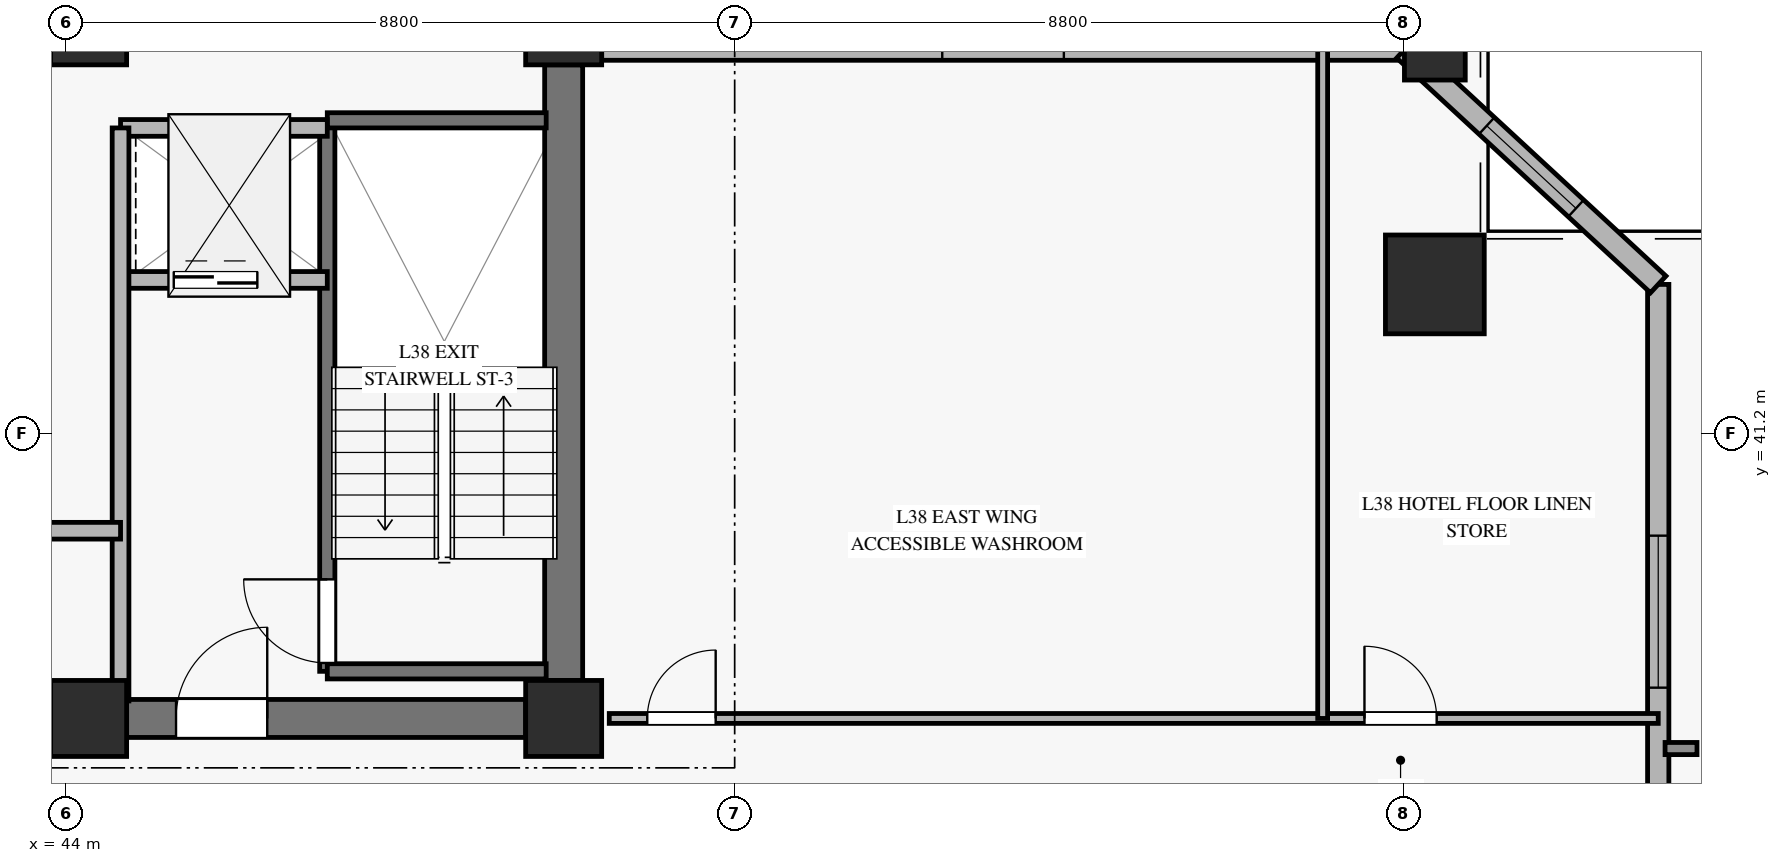
"""IFC4 building model, lengths in metres.
Left out: names, types, materials, properties, quantities, classifications, styles, units other than length and angle.
Written with IfcOpenShell. Run it as: python <this file> out.ifc"""

import sys

from ifc_helpers import new_model, si_unit, direction, frame, frame_2d, origin, origin_2d, place, context, subcontext, project, spatial, rectangle, hollow_rectangle, extrude, source, transform, mapped, element, fill, save


model = new_model("IFC4")
c1 = context("Model", 3, precision=1e-05, world=origin(), true_north=direction((0.0, 1.0)))
c2 = subcontext(c1, "Body", "Model", "MODEL_VIEW")
j1 = project(units=[si_unit("LENGTHUNIT", "METRE"), si_unit("PLANEANGLEUNIT", "RADIAN")], contexts=[c1])
p1 = place(None, origin())
s1 = spatial("IfcSite", under=j1, at=p1, CompositionType="ELEMENT")
p2 = place(p1, origin())
s2 = spatial("IfcBuilding", under=s1, at=p2, CompositionType="ELEMENT")
p3 = place(p2, frame((0.0, 0.0, 156.2)))
s3 = spatial("IfcBuildingStorey", under=s2, at=p3, CompositionType="ELEMENT", Elevation=156.2)
m1 = source(origin(), c2, "Body", "SweptSolid", [
    extrude(rectangle(XDim=1.0, YDim=1.0, at=origin_2d()), origin(), (0.0, 0.0, 1.0), 3.27),
])
for number, where, z_axis, x_axis in (
    (1, (44.3, 37.45, 0.0), (0.0, 0.0, 1.0), (1.0, 0.0, 0.0)),
    (2, (44.3, 46.55, 0.0), (0.0, 0.0, 1.0), (1.0, 0.0, 0.0)),
    (3, (50.55, 37.45, 0.0), (0.0, 0.0, 1.0), (1.0, 0.0, 0.0)),
    (4, (50.55, 46.55, 0.0), (0.0, 0.0, 1.0), (1.0, 0.0, 0.0)),
):
    element("IfcColumn", number, at=place(p3, frame(where, z_axis=z_axis, x_axis=x_axis)), inside=s3, PredefinedType="PILASTER", context=c2, shape_type="MappedRepresentation", body=[
        mapped(m1, transform((0.0, 0.0, 0.0), x_axis=(1.0, 0.0, 0.0), y_axis=(0.0, 1.0, 0.0), z_axis=(0.0, 0.0, 1.0), scale=1.0)),
    ])
p4 = place(p3, frame((44.8, 37.45, 0.0), z_axis=(0.0, 0.0, 1.0), x_axis=(1.0, 0.0, 0.0)))
e5 = element("IfcWall", 5, at=p4, inside=s3, PredefinedType="SHEAR", context=c2, shape_type="SweptSolid", body=[
    extrude(rectangle(XDim=5.25, YDim=0.5, at=frame_2d((2.625, 0.0))), origin(), (0.0, 0.0, 1.0), 3.27),
])
p5 = place(p4, frame((0.65, 0.0, 0.0)))
e6 = element("IfcOpeningElement", 6, at=p5, cuts=e5, PredefinedType="OPENING", context=c2, shape_type="SweptSolid", body=[
    extrude(rectangle(XDim=1.2, YDim=2.15, at=frame_2d((0.6, 1.075))), frame((0.0, 0.26, 0.0), z_axis=(0.0, -1.0, 0.0), x_axis=(1.0, 0.0, 0.0)), (0.0, 0.0, 1.0), 0.52),
])
p6 = place(p3, frame((50.55, 37.95, 0.0), z_axis=(0.0, 0.0, 1.0), x_axis=(0.0, 1.0, 0.0)))
e7 = element("IfcWall", 7, at=p6, inside=s3, PredefinedType="SHEAR", context=c2, shape_type="SweptSolid", body=[
    extrude(rectangle(XDim=8.1, YDim=0.5, at=frame_2d((4.05, 0.0))), origin(), (0.0, 0.0, 1.0), 3.27),
])
m2 = source(origin(), c2, "Body", "SweptSolid", [
    extrude(hollow_rectangle(XDim=1.3, YDim=1.3, WallThickness=0.06, at=origin_2d()), origin(), (0.0, 0.0, 1.0), 3.277),
])
p7 = place(p3, frame((62.012, 43.161, 0.0), z_axis=(-0.063777069764, 0.007972133721, 0.997932327594), x_axis=(-0.124034734589, -0.992277876714, 0.0)))
e8 = element("IfcColumn", 8, at=p7, inside=s3, PredefinedType="COLUMN", context=c2, shape_type="MappedRepresentation", body=[
    mapped(m2, transform((0.0, 0.0, 0.0), x_axis=(1.0, 0.0, 0.0), y_axis=(0.0, 1.0, 0.0), z_axis=(0.0, 0.0, 1.0), scale=1.0)),
])
m3 = source(origin(), c2, "Body", "SweptSolid", [
    extrude(hollow_rectangle(XDim=0.8, YDim=0.8, WallThickness=0.036, at=origin_2d()), origin(), (0.0, 0.0, 1.0), 3.277),
])
p8 = place(p3, frame((62.012, 46.25, 0.0), z_axis=(-0.063779096534, 0.0, 0.997964040858), x_axis=(0.0, -1.0, 0.0)))
e9 = element("IfcColumn", 9, at=p8, inside=s3, PredefinedType="COLUMN", context=c2, shape_type="MappedRepresentation", body=[
    mapped(m3, transform((0.0, 0.0, 0.0), x_axis=(1.0, 0.0, 0.0), y_axis=(0.0, 1.0, 0.0), z_axis=(0.0, 0.0, 1.0), scale=1.0)),
])
p9 = place(p3, frame((64.951, 27.736, 0.0), z_axis=(0.0, 0.0, 1.0), x_axis=(0.0, 1.0, 0.0)))
e10 = element("IfcWall", 10, at=p9, inside=s3, PredefinedType="SOLIDWALL", context=c2, shape_type="SweptSolid", body=[
    extrude(rectangle(XDim=15.425, YDim=0.28, at=frame_2d((7.712, 0.0))), origin(), (0.0, 0.0, 1.0), 2.75),
])
p10 = place(p9, frame((10.119, 0.0, 0.45)))
e11 = element("IfcOpeningElement", 11, at=p10, cuts=e10, PredefinedType="OPENING", context=c2, shape_type="SweptSolid", body=[
    extrude(rectangle(XDim=2.0, YDim=2.0, at=frame_2d((1.0, 1.0))), frame((0.0, 0.15, 0.0), z_axis=(0.0, -1.0, 0.0), x_axis=(1.0, 0.0, 0.0)), (0.0, 0.0, 1.0), 0.3),
])
p11 = place(p3, frame((51.05, 46.25, 0.0), z_axis=(0.0, 0.0, 1.0), x_axis=(1.0, 0.0, 0.0)))
e12 = element("IfcWall", 12, at=p11, inside=s3, PredefinedType="SOLIDWALL", context=c2, shape_type="SweptSolid", body=[
    extrude(rectangle(XDim=10.562, YDim=0.28, at=frame_2d((5.281, 0.0))), origin(), (0.0, 0.0, 1.0), 2.75),
])
p12 = place(p11, frame((4.481, 0.0, 0.45)))
e13 = element("IfcOpeningElement", 13, at=p12, cuts=e12, PredefinedType="OPENING", context=c2, shape_type="SweptSolid", body=[
    extrude(rectangle(XDim=1.6, YDim=2.0, at=frame_2d((0.8, 1.0))), frame((0.0, 0.15, 0.0), z_axis=(0.0, -1.0, 0.0), x_axis=(1.0, 0.0, 0.0)), (0.0, 0.0, 1.0), 0.3),
])
p13 = place(p3, frame((64.951, 43.161, 0.0), z_axis=(0.0, 0.0, 1.0), x_axis=(-0.734027196995, 0.679120073383, 0.0)))
e14 = element("IfcWall", 14, at=p13, inside=s3, PredefinedType="SOLIDWALL", context=c2, shape_type="SweptSolid", body=[
    extrude(rectangle(XDim=4.549, YDim=0.3, at=frame_2d((2.274, 0.0))), origin(), (0.0, 0.0, 1.0), 2.75),
])
p14 = place(p13, frame((1.474, 0.0, 0.45)))
e15 = element("IfcOpeningElement", 15, at=p14, cuts=e14, PredefinedType="OPENING", context=c2, shape_type="SweptSolid", body=[
    extrude(rectangle(XDim=1.6, YDim=2.0, at=frame_2d((0.8, 1.0))), frame((0.0, 0.16, 0.0), z_axis=(0.0, -1.0, 0.0), x_axis=(1.0, 0.0, 0.0)), (0.0, 0.0, 1.0), 0.32),
])
p15 = place(p3, frame((47.44, 38.07, 0.0), z_axis=(0.0, 0.0, 1.0), x_axis=(0.0, 1.0, 0.0)))
e16 = element("IfcWall", 16, at=p15, inside=s3, PredefinedType="SOLIDWALL", context=c2, shape_type="SweptSolid", body=[
    extrude(rectangle(XDim=7.25, YDim=0.2, at=frame_2d((3.625, 0.0))), origin(), (0.0, 0.0, 1.0), 3.5),
])
p16 = place(p15, frame((0.11, 0.0, 0.0)))
e17 = element("IfcOpeningElement", 17, at=p16, cuts=e16, PredefinedType="OPENING", context=c2, shape_type="SweptSolid", body=[
    extrude(rectangle(XDim=1.1, YDim=2.15, at=frame_2d((0.55, 1.075))), frame((0.0, 0.11, 0.0), z_axis=(0.0, -1.0, 0.0), x_axis=(1.0, 0.0, 0.0)), (0.0, 0.0, 1.0), 0.22),
])
for number, where, z_axis, x_axis in (
    (18, (47.44, 45.32, 0.0), (0.0, 0.0, 1.0), (1.0, 0.0, 0.0)),
    (19, (47.44, 38.07, 0.0), (0.0, 0.0, 1.0), (1.0, 0.0, 0.0)),
):
    element("IfcWall", number, at=place(p3, frame(where, z_axis=z_axis, x_axis=x_axis)), inside=s3, PredefinedType="SOLIDWALL", context=c2, shape_type="SweptSolid", body=[
        extrude(rectangle(XDim=2.88, YDim=0.2, at=frame_2d((1.44, 0.0))), origin(), (0.0, 0.0, 1.0), 3.5),
    ])
p17 = place(p3, frame((44.72, 43.22, 0.0), z_axis=(0.0, 0.0, 1.0), x_axis=(1.0, 0.0, 0.0)))
e20 = element("IfcWall", 20, at=p17, inside=s3, PredefinedType="SOLIDWALL", context=c2, shape_type="SweptSolid", body=[
    extrude(rectangle(XDim=2.72, YDim=0.22, at=frame_2d((1.36, 0.0))), origin(), (0.0, 0.0, 1.0), 3.27),
])
p18 = place(p17, frame((0.7, 0.0, 0.0)))
e21 = element("IfcOpeningElement", 21, at=p18, cuts=e20, PredefinedType="OPENING", context=c2, shape_type="SweptSolid", body=[
    extrude(rectangle(XDim=1.1, YDim=2.2, at=frame_2d((0.55, 1.1))), frame((0.0, 0.12, 0.0), z_axis=(0.0, -1.0, 0.0), x_axis=(1.0, 0.0, 0.0)), (0.0, 0.0, 1.0), 0.24),
])
p19 = place(p3, frame((44.72, 45.22, 0.0), z_axis=(0.0, 0.0, 1.0), x_axis=(1.0, 0.0, 0.0)))
e22 = element("IfcWall", 22, at=p19, inside=s3, PredefinedType="SOLIDWALL", context=c2, shape_type="SweptSolid", body=[
    extrude(rectangle(XDim=2.72, YDim=0.22, at=frame_2d((1.36, 0.0))), origin(), (0.0, 0.0, 1.0), 3.27),
])
p20 = place(p3, frame((44.72, 37.68, 0.0), z_axis=(0.0, 0.0, 1.0), x_axis=(0.0, 1.0, 0.0)))
e23 = element("IfcWall", 23, at=p20, inside=s3, PredefinedType="SOLIDWALL", context=c2, shape_type="SweptSolid", body=[
    extrude(rectangle(XDim=7.54, YDim=0.22, at=frame_2d((3.77, 0.0))), origin(), (0.0, 0.0, 1.0), 3.27),
])
p21 = place(p3, frame((36.12, 39.92, 0.0), z_axis=(0.0, 0.0, 1.0), x_axis=(1.0, 0.0, 0.0)))
e24 = element("IfcWall", 24, at=p21, inside=s3, PredefinedType="SOLIDWALL", context=c2, shape_type="SweptSolid", body=[
    extrude(rectangle(XDim=8.6, YDim=0.22, at=frame_2d((4.3, 0.0))), origin(), (0.0, 0.0, 1.0), 2.555),
])
p22 = place(p3, frame((51.15, 37.45, 0.0), z_axis=(0.0, 0.0, 1.0), x_axis=(1.0, 0.0, 0.0)))
e25 = element("IfcWall", 25, at=p22, inside=s3, PredefinedType="PARTITIONING", context=c2, shape_type="SweptSolid", body=[
    extrude(rectangle(XDim=13.801, YDim=0.13, at=frame_2d((6.9, 0.0))), origin(), (0.0, 0.0, 1.0), 2.755),
])
p23 = place(p22, frame((0.5, 0.0, 0.0)))
e26 = element("IfcOpeningElement", 26, at=p23, cuts=e25, PredefinedType="OPENING", context=c2, shape_type="SweptSolid", body=[
    extrude(rectangle(XDim=0.9, YDim=2.1, at=frame_2d((0.45, 1.05))), frame((0.0, 0.075, 0.0), z_axis=(0.0, -1.0, 0.0), x_axis=(1.0, 0.0, 0.0)), (0.0, 0.0, 1.0), 0.15),
])
p24 = place(p22, frame((9.936, 0.0, 0.0)))
e27 = element("IfcOpeningElement", 27, at=p24, cuts=e25, PredefinedType="OPENING", context=c2, shape_type="SweptSolid", body=[
    extrude(rectangle(XDim=0.95, YDim=2.1, at=frame_2d((0.475, 1.05))), frame((0.0, 0.075, 0.0), z_axis=(0.0, -1.0, 0.0), x_axis=(1.0, 0.0, 0.0)), (0.0, 0.0, 1.0), 0.15),
])
p25 = place(p3, frame((60.536, 37.45, 0.0), z_axis=(0.0, 0.0, 1.0), x_axis=(0.0, 1.0, 0.0)))
e28 = element("IfcWall", 28, at=p25, inside=s3, PredefinedType="PARTITIONING", context=c2, shape_type="SweptSolid", body=[
    extrude(rectangle(XDim=8.8, YDim=0.13, at=frame_2d((4.4, 0.0))), origin(), (0.0, 0.0, 1.0), 3.27),
])
m4 = source(origin(), c2, "Body", "SweptSolid", [
    extrude(rectangle(XDim=2.0, YDim=2.0, at=frame_2d((1.0, 1.0))), frame((0.0, 0.03, 0.0), z_axis=(0.0, -1.0, 0.0), x_axis=(1.0, 0.0, 0.0)), (0.0, 0.0, 1.0), 0.06),
])
p26 = place(p10, origin())
e29 = element("IfcWindow", 29, at=p26, inside=s3, PartitioningType="SINGLE_PANEL", PredefinedType="WINDOW", context=c2, shape_type="MappedRepresentation", body=[
    mapped(m4, transform((0.0, 0.0, 0.0), x_axis=(1.0, 0.0, 0.0), y_axis=(0.0, 1.0, 0.0), z_axis=(0.0, 0.0, 1.0), scale=1.0)),
])
fill(e11, e29)
m5 = source(origin(), c2, "Body", "SweptSolid", [
    extrude(rectangle(XDim=1.6, YDim=2.0, at=frame_2d((0.8, 1.0))), frame((0.0, 0.03, 0.0), z_axis=(0.0, -1.0, 0.0), x_axis=(1.0, 0.0, 0.0)), (0.0, 0.0, 1.0), 0.06),
])
p27 = place(p14, origin())
e30 = element("IfcWindow", 30, at=p27, inside=s3, PartitioningType="SINGLE_PANEL", PredefinedType="WINDOW", context=c2, shape_type="MappedRepresentation", body=[
    mapped(m5, transform((0.0, 0.0, 0.0), x_axis=(1.0, 0.0, 0.0), y_axis=(0.0, 1.0, 0.0), z_axis=(0.0, 0.0, 1.0), scale=1.0)),
])
fill(e15, e30)
m6 = source(origin(), c2, "Body", "SweptSolid", [
    extrude(rectangle(XDim=1.1, YDim=2.15, at=frame_2d((0.55, 1.075))), frame((0.0, 0.025, 0.0), z_axis=(0.0, -1.0, 0.0), x_axis=(1.0, 0.0, 0.0)), (0.0, 0.0, 1.0), 0.05),
])
p28 = place(p16, origin())
e31 = element("IfcDoor", 31, at=p28, inside=s3, OperationType="SINGLE_SWING_RIGHT", PredefinedType="DOOR", context=c2, shape_type="MappedRepresentation", body=[
    mapped(m6, transform((0.0, 0.0, 0.0), x_axis=(1.0, 0.0, 0.0), y_axis=(0.0, 1.0, 0.0), z_axis=(0.0, 0.0, 1.0), scale=1.0)),
])
fill(e17, e31)
m7 = source(origin(), c2, "Body", "SweptSolid", [
    extrude(rectangle(XDim=1.1, YDim=2.2, at=frame_2d((0.55, 1.1))), frame((0.0, 0.025, 0.0), z_axis=(0.0, -1.0, 0.0), x_axis=(1.0, 0.0, 0.0)), (0.0, 0.0, 1.0), 0.05),
])
p29 = place(p18, origin())
e32 = element("IfcDoor", 32, at=p29, inside=s3, OperationType="SLIDING_TO_LEFT", PredefinedType="DOOR", context=c2, shape_type="MappedRepresentation", body=[
    mapped(m7, transform((0.0, 0.0, 0.0), x_axis=(1.0, 0.0, 0.0), y_axis=(0.0, 1.0, 0.0), z_axis=(0.0, 0.0, 1.0), scale=1.0)),
])
fill(e21, e32)
m8 = source(origin(), c2, "Body", "SweptSolid", [
    extrude(rectangle(XDim=1.2, YDim=2.15, at=frame_2d((0.6, 1.075))), frame((0.0, 0.025, 0.0), z_axis=(0.0, -1.0, 0.0), x_axis=(1.0, 0.0, 0.0)), (0.0, 0.0, 1.0), 0.05),
])
p30 = place(p5, origin())
e33 = element("IfcDoor", 33, at=p30, inside=s3, OperationType="SINGLE_SWING_RIGHT", PredefinedType="DOOR", context=c2, shape_type="MappedRepresentation", body=[
    mapped(m8, transform((0.0, 0.0, 0.0), x_axis=(1.0, 0.0, 0.0), y_axis=(0.0, 1.0, 0.0), z_axis=(0.0, 0.0, 1.0), scale=1.0)),
])
fill(e6, e33)
m9 = source(origin(), c2, "Body", "SweptSolid", [
    extrude(rectangle(XDim=0.9, YDim=2.1, at=frame_2d((0.45, 1.05))), frame((0.0, 0.025, 0.0), z_axis=(0.0, -1.0, 0.0), x_axis=(1.0, 0.0, 0.0)), (0.0, 0.0, 1.0), 0.05),
])
p31 = place(p23, origin())
e34 = element("IfcDoor", 34, at=p31, inside=s3, OperationType="SINGLE_SWING_RIGHT", PredefinedType="DOOR", context=c2, shape_type="MappedRepresentation", body=[
    mapped(m9, transform((0.0, 0.0, 0.0), x_axis=(1.0, 0.0, 0.0), y_axis=(0.0, 1.0, 0.0), z_axis=(0.0, 0.0, 1.0), scale=1.0)),
])
fill(e26, e34)
m10 = source(origin(), c2, "Body", "SweptSolid", [
    extrude(rectangle(XDim=0.95, YDim=2.1, at=frame_2d((0.475, 1.05))), frame((0.0, 0.025, 0.0), z_axis=(0.0, -1.0, 0.0), x_axis=(1.0, 0.0, 0.0)), (0.0, 0.0, 1.0), 0.05),
])
p32 = place(p24, origin())
e35 = element("IfcDoor", 35, at=p32, inside=s3, OperationType="SINGLE_SWING_LEFT", PredefinedType="DOOR", context=c2, shape_type="MappedRepresentation", body=[
    mapped(m10, transform((0.0, 0.0, 0.0), x_axis=(1.0, 0.0, 0.0), y_axis=(0.0, 1.0, 0.0), z_axis=(0.0, 0.0, 1.0), scale=1.0)),
])
fill(e27, e35)
save(model, sys.argv[1])
